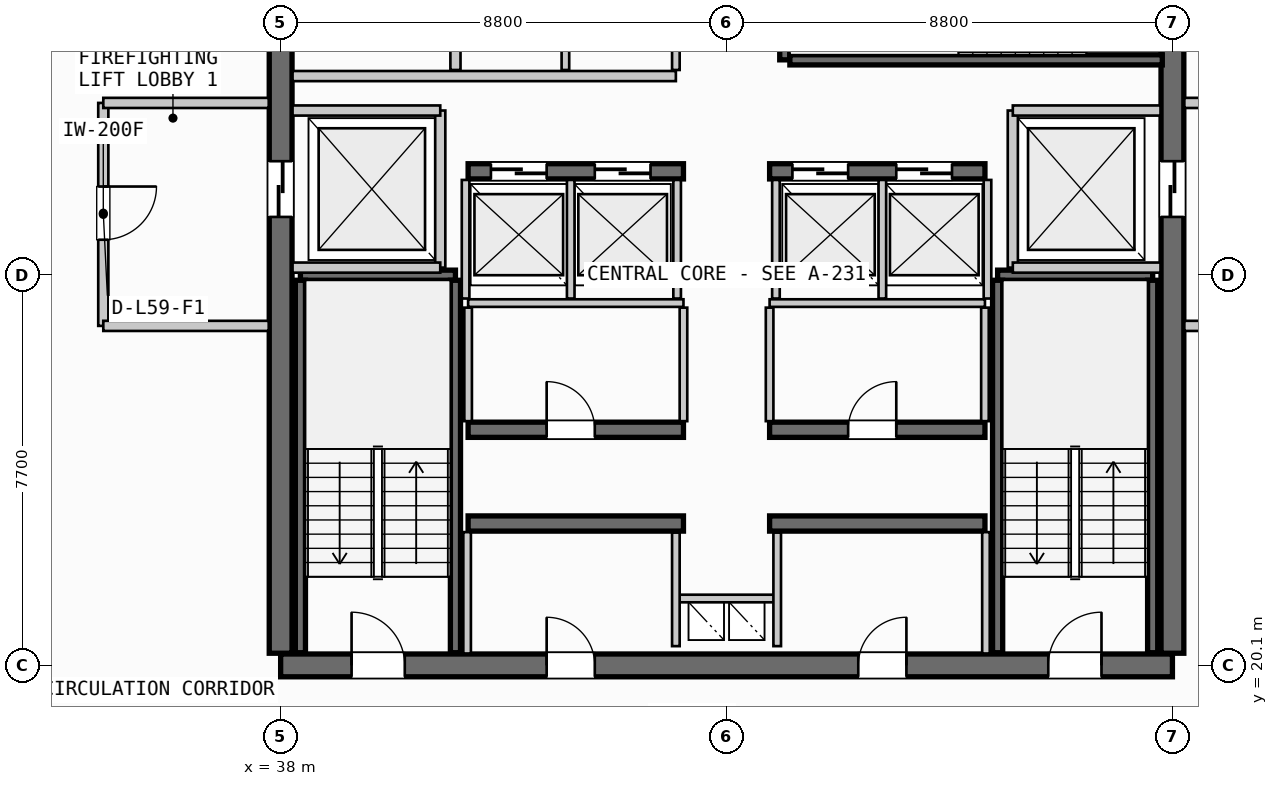
"""IFC4 building model, lengths in metres.
Left out: names, types, materials, properties, quantities, classifications, styles, units other than length and angle.
Written with IfcOpenShell. Run it as: python <this file> out.ifc"""

import sys

from ifc_helpers import new_model, si_unit, direction, frame, frame_2d, origin, place, context, subcontext, project, spatial, rectangle, extrude, source, transform, mapped, element, fill, save


model = new_model("IFC4")
c1 = context("Model", 3, precision=1e-05, world=origin(), true_north=direction((0.0, 1.0)))
c2 = subcontext(c1, "Body", "Model", "MODEL_VIEW")
j1 = project(units=[si_unit("LENGTHUNIT", "METRE"), si_unit("PLANEANGLEUNIT", "RADIAN")], contexts=[c1])
p1 = place(None, origin())
s1 = spatial("IfcSite", under=j1, at=p1, CompositionType="ELEMENT")
p2 = place(p1, origin())
s2 = spatial("IfcBuilding", under=s1, at=p2, CompositionType="ELEMENT")
p3 = place(p2, frame((0.0, 0.0, 228.4)))
s3 = spatial("IfcBuildingStorey", under=s2, at=p3, CompositionType="ELEMENT", Elevation=228.4)
p4 = place(p3, frame((38.0, 20.1, 0.0), z_axis=(0.0, 0.0, 1.0), x_axis=(1.0, 0.0, 0.0)))
e1 = element("IfcWall", 1, at=p4, inside=s3, PredefinedType="SHEAR", context=c2, shape_type="SweptSolid", body=[
    extrude(rectangle(XDim=17.6, YDim=0.45, at=frame_2d((8.8, 0.0))), origin(), (0.0, 0.0, 1.0), 3.21),
])
p5 = place(p4, frame((1.4, 0.0, 0.0)))
e2 = element("IfcOpeningElement", 2, at=p5, cuts=e1, PredefinedType="OPENING", context=c2, shape_type="SweptSolid", body=[
    extrude(rectangle(XDim=1.05, YDim=2.15, at=frame_2d((0.525, 1.075))), frame((0.0, 0.235, 0.0), z_axis=(0.0, -1.0, 0.0), x_axis=(1.0, 0.0, 0.0)), (0.0, 0.0, 1.0), 0.47),
])
p6 = place(p4, frame((15.15, 0.0, 0.0)))
e3 = element("IfcOpeningElement", 3, at=p6, cuts=e1, PredefinedType="OPENING", context=c2, shape_type="SweptSolid", body=[
    extrude(rectangle(XDim=1.05, YDim=2.15, at=frame_2d((0.525, 1.075))), frame((0.0, 0.235, 0.0), z_axis=(0.0, -1.0, 0.0), x_axis=(1.0, 0.0, 0.0)), (0.0, 0.0, 1.0), 0.47),
])
p7 = place(p4, frame((5.25, 0.0, 0.0)))
e4 = element("IfcOpeningElement", 4, at=p7, cuts=e1, PredefinedType="OPENING", context=c2, shape_type="SweptSolid", body=[
    extrude(rectangle(XDim=0.95, YDim=2.15, at=frame_2d((0.475, 1.075))), frame((0.0, 0.235, 0.0), z_axis=(0.0, -1.0, 0.0), x_axis=(1.0, 0.0, 0.0)), (0.0, 0.0, 1.0), 0.47),
])
p8 = place(p4, frame((11.4, 0.0, 0.0)))
e5 = element("IfcOpeningElement", 5, at=p8, cuts=e1, PredefinedType="OPENING", context=c2, shape_type="SweptSolid", body=[
    extrude(rectangle(XDim=0.95, YDim=2.15, at=frame_2d((0.475, 1.075))), frame((0.0, 0.235, 0.0), z_axis=(0.0, -1.0, 0.0), x_axis=(1.0, 0.0, 0.0)), (0.0, 0.0, 1.0), 0.47),
])
p9 = place(p3, frame((38.0, 35.26, 0.0), z_axis=(0.0, 0.0, 1.0), x_axis=(0.0, -1.0, 0.0)))
e6 = element("IfcWall", 6, at=p9, inside=s3, PredefinedType="SHEAR", context=c2, shape_type="SweptSolid", body=[
    extrude(rectangle(XDim=14.92, YDim=0.45, at=frame_2d((7.46, 0.0))), origin(), (0.0, 0.0, 1.0), 3.21),
])
p10 = place(p9, frame((5.21, 0.0, 0.0)))
e7 = element("IfcOpeningElement", 7, at=p10, cuts=e6, PredefinedType="OPENING", context=c2, shape_type="SweptSolid", body=[
    extrude(rectangle(XDim=1.1, YDim=2.2, at=frame_2d((0.55, 1.1))), frame((0.0, 0.235, 0.0), z_axis=(0.0, -1.0, 0.0), x_axis=(1.0, 0.0, 0.0)), (0.0, 0.0, 1.0), 0.47),
])
p11 = place(p3, frame((55.6, 20.34, 0.0), z_axis=(0.0, 0.0, 1.0), x_axis=(0.0, 1.0, 0.0)))
e8 = element("IfcWall", 8, at=p11, inside=s3, PredefinedType="SHEAR", context=c2, shape_type="SweptSolid", body=[
    extrude(rectangle(XDim=14.92, YDim=0.45, at=frame_2d((7.46, 0.0))), origin(), (0.0, 0.0, 1.0), 3.21),
])
p12 = place(p11, frame((12.71, 0.0, 0.0)))
e9 = element("IfcOpeningElement", 9, at=p12, cuts=e8, PredefinedType="OPENING", context=c2, shape_type="SweptSolid", body=[
    extrude(rectangle(XDim=1.05, YDim=2.15, at=frame_2d((0.525, 1.075))), frame((0.0, 0.235, 0.0), z_axis=(0.0, -1.0, 0.0), x_axis=(1.0, 0.0, 0.0)), (0.0, 0.0, 1.0), 0.47),
])
p13 = place(p11, frame((8.61, 0.0, 0.0)))
e10 = element("IfcOpeningElement", 10, at=p13, cuts=e8, PredefinedType="OPENING", context=c2, shape_type="SweptSolid", body=[
    extrude(rectangle(XDim=1.1, YDim=2.2, at=frame_2d((0.55, 1.1))), frame((0.0, 0.235, 0.0), z_axis=(0.0, -1.0, 0.0), x_axis=(1.0, 0.0, 0.0)), (0.0, 0.0, 1.0), 0.47),
])
for number, where, z_axis, x_axis in (
    (11, (41.7, 22.9, 0.0), (0.0, 0.0, 1.0), (1.0, 0.0, 0.0)),
    (12, (47.65, 22.9, 0.0), (0.0, 0.0, 1.0), (1.0, 0.0, 0.0)),
):
    element("IfcWall", number, at=place(p3, frame(where, z_axis=z_axis, x_axis=x_axis)), inside=s3, PredefinedType="SHEAR", context=c2, shape_type="SweptSolid", body=[
        extrude(rectangle(XDim=4.25, YDim=0.3, at=frame_2d((2.125, 0.0))), origin(), (0.0, 0.0, 1.0), 3.21),
    ])
p14 = place(p3, frame((41.7, 24.75, 0.0), z_axis=(0.0, 0.0, 1.0), x_axis=(1.0, 0.0, 0.0)))
e13 = element("IfcWall", 13, at=p14, inside=s3, PredefinedType="SHEAR", context=c2, shape_type="SweptSolid", body=[
    extrude(rectangle(XDim=4.25, YDim=0.3, at=frame_2d((2.125, 0.0))), origin(), (0.0, 0.0, 1.0), 3.21),
])
p15 = place(p14, frame((1.55, 0.0, 0.0)))
e14 = element("IfcOpeningElement", 14, at=p15, cuts=e13, PredefinedType="OPENING", context=c2, shape_type="SweptSolid", body=[
    extrude(rectangle(XDim=0.95, YDim=2.15, at=frame_2d((0.475, 1.075))), frame((0.0, 0.16, 0.0), z_axis=(0.0, -1.0, 0.0), x_axis=(1.0, 0.0, 0.0)), (0.0, 0.0, 1.0), 0.32),
])
p16 = place(p3, frame((47.65, 24.75, 0.0), z_axis=(0.0, 0.0, 1.0), x_axis=(1.0, 0.0, 0.0)))
e15 = element("IfcWall", 15, at=p16, inside=s3, PredefinedType="SHEAR", context=c2, shape_type="SweptSolid", body=[
    extrude(rectangle(XDim=4.25, YDim=0.3, at=frame_2d((2.125, 0.0))), origin(), (0.0, 0.0, 1.0), 3.21),
])
p17 = place(p16, frame((1.55, 0.0, 0.0)))
e16 = element("IfcOpeningElement", 16, at=p17, cuts=e15, PredefinedType="OPENING", context=c2, shape_type="SweptSolid", body=[
    extrude(rectangle(XDim=0.95, YDim=2.15, at=frame_2d((0.475, 1.075))), frame((0.0, 0.16, 0.0), z_axis=(0.0, -1.0, 0.0), x_axis=(1.0, 0.0, 0.0)), (0.0, 0.0, 1.0), 0.32),
])
p18 = place(p3, frame((41.7, 29.85, 0.0), z_axis=(0.0, 0.0, 1.0), x_axis=(1.0, 0.0, 0.0)))
e17 = element("IfcWall", 17, at=p18, inside=s3, PredefinedType="SHEAR", context=c2, shape_type="SweptSolid", body=[
    extrude(rectangle(XDim=4.25, YDim=0.3, at=frame_2d((2.125, 0.0))), origin(), (0.0, 0.0, 1.0), 3.21),
])
p19 = place(p18, frame((0.45, 0.0, 0.0)))
e18 = element("IfcOpeningElement", 18, at=p19, cuts=e17, PredefinedType="OPENING", context=c2, shape_type="SweptSolid", body=[
    extrude(rectangle(XDim=1.1, YDim=2.2, at=frame_2d((0.55, 1.1))), frame((0.0, 0.16, 0.0), z_axis=(0.0, -1.0, 0.0), x_axis=(1.0, 0.0, 0.0)), (0.0, 0.0, 1.0), 0.32),
])
p20 = place(p18, frame((2.5, 0.0, 0.0)))
e19 = element("IfcOpeningElement", 19, at=p20, cuts=e17, PredefinedType="OPENING", context=c2, shape_type="SweptSolid", body=[
    extrude(rectangle(XDim=1.1, YDim=2.2, at=frame_2d((0.55, 1.1))), frame((0.0, 0.16, 0.0), z_axis=(0.0, -1.0, 0.0), x_axis=(1.0, 0.0, 0.0)), (0.0, 0.0, 1.0), 0.32),
])
p21 = place(p3, frame((47.65, 29.85, 0.0), z_axis=(0.0, 0.0, 1.0), x_axis=(1.0, 0.0, 0.0)))
e20 = element("IfcWall", 20, at=p21, inside=s3, PredefinedType="SHEAR", context=c2, shape_type="SweptSolid", body=[
    extrude(rectangle(XDim=4.25, YDim=0.3, at=frame_2d((2.125, 0.0))), origin(), (0.0, 0.0, 1.0), 3.21),
])
p22 = place(p21, frame((0.45, 0.0, 0.0)))
e21 = element("IfcOpeningElement", 21, at=p22, cuts=e20, PredefinedType="OPENING", context=c2, shape_type="SweptSolid", body=[
    extrude(rectangle(XDim=1.1, YDim=2.2, at=frame_2d((0.55, 1.1))), frame((0.0, 0.16, 0.0), z_axis=(0.0, -1.0, 0.0), x_axis=(1.0, 0.0, 0.0)), (0.0, 0.0, 1.0), 0.32),
])
p23 = place(p21, frame((2.5, 0.0, 0.0)))
e22 = element("IfcOpeningElement", 22, at=p23, cuts=e20, PredefinedType="OPENING", context=c2, shape_type="SweptSolid", body=[
    extrude(rectangle(XDim=1.1, YDim=2.2, at=frame_2d((0.55, 1.1))), frame((0.0, 0.16, 0.0), z_axis=(0.0, -1.0, 0.0), x_axis=(1.0, 0.0, 0.0)), (0.0, 0.0, 1.0), 0.32),
])
p24 = place(p3, frame((38.39, 27.8, 0.0), z_axis=(0.0, 0.0, 1.0), x_axis=(1.0, 0.0, 0.0)))
e23 = element("IfcWall", 23, at=p24, inside=s3, PredefinedType="SHEAR", context=c2, shape_type="SweptSolid", body=[
    extrude(rectangle(XDim=3.06, YDim=0.2, at=frame_2d((1.53, 0.0))), origin(), (0.0, 0.0, 1.0), 3.21),
])
for number, where, z_axis, x_axis in (
    (24, (41.45, 27.7, 0.0), (0.0, 0.0, 1.0), (0.0, -1.0, 0.0)),
    (25, (38.39, 20.35, 0.0), (0.0, 0.0, 1.0), (0.0, 1.0, 0.0)),
):
    element("IfcWall", number, at=place(p3, frame(where, z_axis=z_axis, x_axis=x_axis)), inside=s3, PredefinedType="SHEAR", context=c2, shape_type="SweptSolid", body=[
        extrude(rectangle(XDim=7.35, YDim=0.2, at=frame_2d((3.675, 0.0))), origin(), (0.0, 0.0, 1.0), 3.21),
    ])
p25 = place(p3, frame((52.15, 27.8, 0.0), z_axis=(0.0, 0.0, 1.0), x_axis=(1.0, 0.0, 0.0)))
e26 = element("IfcWall", 26, at=p25, inside=s3, PredefinedType="SHEAR", context=c2, shape_type="SweptSolid", body=[
    extrude(rectangle(XDim=3.06, YDim=0.2, at=frame_2d((1.53, 0.0))), origin(), (0.0, 0.0, 1.0), 3.21),
])
for number, where, z_axis, x_axis in (
    (27, (55.21, 27.7, 0.0), (0.0, 0.0, 1.0), (0.0, -1.0, 0.0)),
    (28, (52.15, 20.35, 0.0), (0.0, 0.0, 1.0), (0.0, 1.0, 0.0)),
):
    element("IfcWall", number, at=place(p3, frame(where, z_axis=z_axis, x_axis=x_axis)), inside=s3, PredefinedType="SHEAR", context=c2, shape_type="SweptSolid", body=[
        extrude(rectangle(XDim=7.35, YDim=0.2, at=frame_2d((3.675, 0.0))), origin(), (0.0, 0.0, 1.0), 3.21),
    ])
p26 = place(p3, frame((47.95, 32.05, 0.0), z_axis=(0.0, 0.0, 1.0), x_axis=(0.0, 1.0, 0.0)))
e29 = element("IfcWall", 29, at=p26, inside=s3, PredefinedType="SHEAR", context=c2, shape_type="SweptSolid", body=[
    extrude(rectangle(XDim=3.06, YDim=0.2, at=frame_2d((1.53, 0.0))), origin(), (0.0, 0.0, 1.0), 3.21),
])
p27 = place(p3, frame((55.4, 32.05, 0.0), z_axis=(0.0, 0.0, 1.0), x_axis=(-1.0, 0.0, 0.0)))
e30 = element("IfcWall", 30, at=p27, inside=s3, PredefinedType="SHEAR", context=c2, shape_type="SweptSolid", body=[
    extrude(rectangle(XDim=7.35, YDim=0.2, at=frame_2d((3.675, 0.0))), origin(), (0.0, 0.0, 1.0), 3.21),
])
p28 = place(p3, frame((45.8, 21.42, 0.0), z_axis=(0.0, 0.0, 1.0), x_axis=(1.0, 0.0, 0.0)))
e31 = element("IfcWall", 31, at=p28, inside=s3, PredefinedType="PARTITIONING", context=c2, shape_type="SweptSolid", body=[
    extrude(rectangle(XDim=2.0, YDim=0.15, at=frame_2d((1.0, 0.0))), origin(), (0.0, 0.0, 1.0), 2.28),
])
for number, where, z_axis, x_axis in (
    (32, (45.8, 20.48, 0.0), (0.0, 0.0, 1.0), (0.0, 1.0, 0.0)),
    (33, (47.8, 20.48, 0.0), (0.0, 0.0, 1.0), (0.0, 1.0, 0.0)),
):
    element("IfcWall", number, at=place(p3, frame(where, z_axis=z_axis, x_axis=x_axis)), inside=s3, PredefinedType="PARTITIONING", context=c2, shape_type="SweptSolid", body=[
        extrude(rectangle(XDim=2.24, YDim=0.15, at=frame_2d((1.12, 0.0))), origin(), (0.0, 0.0, 1.0), 2.28),
    ])
p29 = place(p3, frame((41.15, 27.95, 0.0), z_axis=(0.0, 0.0, 1.0), x_axis=(0.0, 1.0, 0.0)))
e34 = element("IfcWall", 34, at=p29, inside=s3, PredefinedType="PARTITIONING", context=c2, shape_type="SweptSolid", body=[
    extrude(rectangle(XDim=3.1, YDim=0.2, at=frame_2d((1.55, 0.0))), origin(), (0.0, 0.0, 1.0), 2.28),
])
for number, where, z_axis, x_axis in (
    (35, (38.235, 27.95, 0.0), (0.0, 0.0, 1.0), (1.0, 0.0, 0.0)),
    (36, (38.235, 31.05, 0.0), (0.0, 0.0, 1.0), (1.0, 0.0, 0.0)),
):
    element("IfcWall", number, at=place(p3, frame(where, z_axis=z_axis, x_axis=x_axis)), inside=s3, PredefinedType="PARTITIONING", context=c2, shape_type="SweptSolid", body=[
        extrude(rectangle(XDim=2.915, YDim=0.2, at=frame_2d((1.458, 0.0))), origin(), (0.0, 0.0, 1.0), 2.28),
    ])
p30 = place(p3, frame((34.5, 31.2, 0.0), z_axis=(0.0, 0.0, 1.0), x_axis=(0.0, -1.0, 0.0)))
e37 = element("IfcWall", 37, at=p30, inside=s3, PredefinedType="PARTITIONING", context=c2, shape_type="SweptSolid", body=[
    extrude(rectangle(XDim=4.4, YDim=0.2, at=frame_2d((2.2, 0.0))), origin(), (0.0, 0.0, 1.0), 2.28),
])
p31 = place(p30, frame((1.65, 0.0, 0.0)))
e38 = element("IfcOpeningElement", 38, at=p31, cuts=e37, PredefinedType="OPENING", context=c2, shape_type="SweptSolid", body=[
    extrude(rectangle(XDim=1.05, YDim=2.15, at=frame_2d((0.525, 1.075))), frame((0.0, 0.11, 0.0), z_axis=(0.0, -1.0, 0.0), x_axis=(1.0, 0.0, 0.0)), (0.0, 0.0, 1.0), 0.22),
])
for number, where, z_axis, x_axis in (
    (39, (34.5, 26.8, 0.0), (0.0, 0.0, 1.0), (1.0, 0.0, 0.0)),
    (40, (34.5, 31.2, 0.0), (0.0, 0.0, 1.0), (1.0, 0.0, 0.0)),
):
    element("IfcWall", number, at=place(p3, frame(where, z_axis=z_axis, x_axis=x_axis)), inside=s3, PredefinedType="PARTITIONING", context=c2, shape_type="SweptSolid", body=[
        extrude(rectangle(XDim=3.265, YDim=0.2, at=frame_2d((1.632, 0.0))), origin(), (0.0, 0.0, 1.0), 2.28),
    ])
p32 = place(p3, frame((52.45, 27.95, 0.0), z_axis=(0.0, 0.0, 1.0), x_axis=(0.0, 1.0, 0.0)))
e41 = element("IfcWall", 41, at=p32, inside=s3, PredefinedType="PARTITIONING", context=c2, shape_type="SweptSolid", body=[
    extrude(rectangle(XDim=3.1, YDim=0.2, at=frame_2d((1.55, 0.0))), origin(), (0.0, 0.0, 1.0), 2.28),
])
for number, where, z_axis, x_axis in (
    (42, (52.45, 27.95, 0.0), (0.0, 0.0, 1.0), (1.0, 0.0, 0.0)),
    (43, (52.45, 31.05, 0.0), (0.0, 0.0, 1.0), (1.0, 0.0, 0.0)),
):
    element("IfcWall", number, at=place(p3, frame(where, z_axis=z_axis, x_axis=x_axis)), inside=s3, PredefinedType="PARTITIONING", context=c2, shape_type="SweptSolid", body=[
        extrude(rectangle(XDim=2.915, YDim=0.2, at=frame_2d((1.458, 0.0))), origin(), (0.0, 0.0, 1.0), 2.28),
    ])
for number, where, z_axis, x_axis in (
    (44, (55.835, 26.8, 0.0), (0.0, 0.0, 1.0), (1.0, 0.0, 0.0)),
    (45, (55.835, 31.2, 0.0), (0.0, 0.0, 1.0), (1.0, 0.0, 0.0)),
):
    element("IfcWall", number, at=place(p3, frame(where, z_axis=z_axis, x_axis=x_axis)), inside=s3, PredefinedType="PARTITIONING", context=c2, shape_type="SweptSolid", body=[
        extrude(rectangle(XDim=3.265, YDim=0.2, at=frame_2d((1.633, 0.0))), origin(), (0.0, 0.0, 1.0), 2.28),
    ])
for number, where, z_axis, x_axis in (
    (46, (41.68, 20.335, 0.0), (0.0, 0.0, 1.0), (0.0, 1.0, 0.0)),
    (47, (51.92, 20.335, 0.0), (0.0, 0.0, 1.0), (0.0, 1.0, 0.0)),
):
    element("IfcWall", number, at=place(p3, frame(where, z_axis=z_axis, x_axis=x_axis)), inside=s3, PredefinedType="PARTITIONING", context=c2, shape_type="SweptSolid", body=[
        extrude(rectangle(XDim=2.395, YDim=0.15, at=frame_2d((1.198, 0.0))), origin(), (0.0, 0.0, 1.0), 2.28),
    ])
for number, where, z_axis, x_axis in (
    (48, (41.7, 27.25, 0.0), (0.0, 0.0, 1.0), (1.0, 0.0, 0.0)),
    (49, (47.65, 27.25, 0.0), (0.0, 0.0, 1.0), (1.0, 0.0, 0.0)),
):
    element("IfcWall", number, at=place(p3, frame(where, z_axis=z_axis, x_axis=x_axis)), inside=s3, PredefinedType="PARTITIONING", context=c2, shape_type="SweptSolid", body=[
        extrude(rectangle(XDim=4.25, YDim=0.15, at=frame_2d((2.125, 0.0))), origin(), (0.0, 0.0, 1.0), 2.28),
    ])
for number, where, z_axis, x_axis in (
    (50, (41.7, 24.92, 0.0), (0.0, 0.0, 1.0), (0.0, 1.0, 0.0)),
    (51, (45.95, 24.92, 0.0), (0.0, 0.0, 1.0), (0.0, 1.0, 0.0)),
    (52, (47.65, 24.92, 0.0), (0.0, 0.0, 1.0), (0.0, 1.0, 0.0)),
    (53, (51.9, 24.92, 0.0), (0.0, 0.0, 1.0), (0.0, 1.0, 0.0)),
):
    element("IfcWall", number, at=place(p3, frame(where, z_axis=z_axis, x_axis=x_axis)), inside=s3, PredefinedType="PARTITIONING", context=c2, shape_type="SweptSolid", body=[
        extrude(rectangle(XDim=2.24, YDim=0.15, at=frame_2d((1.12, 0.0))), origin(), (0.0, 0.0, 1.0), 2.28),
    ])
for number, where, z_axis, x_axis in (
    (54, (41.65, 27.34, 0.0), (0.0, 0.0, 1.0), (0.0, 1.0, 0.0)),
    (55, (43.725, 27.34, 0.0), (0.0, 0.0, 1.0), (0.0, 1.0, 0.0)),
    (56, (45.825, 27.34, 0.0), (0.0, 0.0, 1.0), (0.0, 1.0, 0.0)),
    (57, (47.775, 27.34, 0.0), (0.0, 0.0, 1.0), (0.0, 1.0, 0.0)),
    (58, (49.875, 27.34, 0.0), (0.0, 0.0, 1.0), (0.0, 1.0, 0.0)),
    (59, (51.95, 27.34, 0.0), (0.0, 0.0, 1.0), (0.0, 1.0, 0.0)),
):
    element("IfcWall", number, at=place(p3, frame(where, z_axis=z_axis, x_axis=x_axis)), inside=s3, PredefinedType="PARTITIONING", context=c2, shape_type="SweptSolid", body=[
        extrude(rectangle(XDim=2.34, YDim=0.15, at=frame_2d((1.17, 0.0))), origin(), (0.0, 0.0, 1.0), 2.28),
    ])
p33 = place(p3, frame((41.45, 31.85, 0.0), z_axis=(0.0, 0.0, 1.0), x_axis=(0.0, 1.0, 0.0)))
e60 = element("IfcWall", 60, at=p33, inside=s3, PredefinedType="PARTITIONING", context=c2, shape_type="SweptSolid", body=[
    extrude(rectangle(XDim=3.415, YDim=0.2, at=frame_2d((1.708, 0.0))), origin(), (0.0, 0.0, 1.0), 2.28),
])
p34 = place(p3, frame((38.235, 31.73, 0.0), z_axis=(0.0, 0.0, 1.0), x_axis=(1.0, 0.0, 0.0)))
e61 = element("IfcWall", 61, at=p34, inside=s3, PredefinedType="PARTITIONING", context=c2, shape_type="SweptSolid", body=[
    extrude(rectangle(XDim=7.565, YDim=0.2, at=frame_2d((3.782, 0.0))), origin(), (0.0, 0.0, 1.0), 2.28),
])
p35 = place(p3, frame((45.8, 31.85, 0.0), z_axis=(0.0, 0.0, 1.0), x_axis=(0.0, 1.0, 0.0)))
e62 = element("IfcWall", 62, at=p35, inside=s3, PredefinedType="PARTITIONING", context=c2, shape_type="SweptSolid", body=[
    extrude(rectangle(XDim=3.415, YDim=0.15, at=frame_2d((1.708, 0.0))), origin(), (0.0, 0.0, 1.0), 2.28),
])
p36 = place(p3, frame((43.62, 31.85, 0.0), z_axis=(0.0, 0.0, 1.0), x_axis=(0.0, 1.0, 0.0)))
e63 = element("IfcWall", 63, at=p36, inside=s3, PredefinedType="PLUMBINGWALL", context=c2, shape_type="SweptSolid", body=[
    extrude(rectangle(XDim=3.415, YDim=0.15, at=frame_2d((1.708, 0.0))), origin(), (0.0, 0.0, 1.0), 2.28),
])
m1 = source(origin(), c2, "Body", "SweptSolid", [
    extrude(rectangle(XDim=1.05, YDim=2.15, at=frame_2d((0.525, 1.075))), frame((0.0, 0.025, 0.0), z_axis=(0.0, -1.0, 0.0), x_axis=(1.0, 0.0, 0.0)), (0.0, 0.0, 1.0), 0.05),
])
p37 = place(p5, origin())
e64 = element("IfcDoor", 64, at=p37, inside=s3, OperationType="SINGLE_SWING_LEFT", PredefinedType="DOOR", context=c2, shape_type="MappedRepresentation", body=[
    mapped(m1, transform((0.0, 0.0, 0.0), scale=1.0)),
])
fill(e2, e64)
p38 = place(p6, origin())
e65 = element("IfcDoor", 65, at=p38, inside=s3, OperationType="SINGLE_SWING_RIGHT", PredefinedType="DOOR", context=c2, shape_type="MappedRepresentation", body=[
    mapped(m1, transform((0.0, 0.0, 0.0), scale=1.0)),
])
fill(e3, e65)
m2 = source(origin(), c2, "Body", "SweptSolid", [
    extrude(rectangle(XDim=1.1, YDim=2.2, at=frame_2d((0.55, 1.1))), frame((0.0, 0.025, 0.0), z_axis=(0.0, -1.0, 0.0), x_axis=(1.0, 0.0, 0.0)), (0.0, 0.0, 1.0), 0.05),
])
p39 = place(p10, origin())
e66 = element("IfcDoor", 66, at=p39, inside=s3, OperationType="SLIDING_TO_LEFT", PredefinedType="DOOR", context=c2, shape_type="MappedRepresentation", body=[
    mapped(m2, transform((0.0, 0.0, 0.0), scale=1.0)),
])
fill(e7, e66)
p40 = place(p13, origin())
e67 = element("IfcDoor", 67, at=p40, inside=s3, OperationType="SLIDING_TO_RIGHT", PredefinedType="DOOR", context=c2, shape_type="MappedRepresentation", body=[
    mapped(m2, transform((0.0, 0.0, 0.0), scale=1.0)),
])
fill(e10, e67)
m3 = source(origin(), c2, "Body", "SweptSolid", [
    extrude(rectangle(XDim=0.95, YDim=2.15, at=frame_2d((0.475, 1.075))), frame((0.0, 0.025, 0.0), z_axis=(0.0, -1.0, 0.0), x_axis=(1.0, 0.0, 0.0)), (0.0, 0.0, 1.0), 0.05),
])
p41 = place(p7, origin())
e68 = element("IfcDoor", 68, at=p41, inside=s3, OperationType="SINGLE_SWING_LEFT", PredefinedType="DOOR", context=c2, shape_type="MappedRepresentation", body=[
    mapped(m3, transform((0.0, 0.0, 0.0), scale=1.0)),
])
fill(e4, e68)
p42 = place(p8, origin())
e69 = element("IfcDoor", 69, at=p42, inside=s3, OperationType="SINGLE_SWING_RIGHT", PredefinedType="DOOR", context=c2, shape_type="MappedRepresentation", body=[
    mapped(m3, transform((0.0, 0.0, 0.0), scale=1.0)),
])
fill(e5, e69)
p43 = place(p15, origin())
e70 = element("IfcDoor", 70, at=p43, inside=s3, OperationType="SINGLE_SWING_LEFT", PredefinedType="DOOR", context=c2, shape_type="MappedRepresentation", body=[
    mapped(m3, transform((0.0, 0.0, 0.0), scale=1.0)),
])
fill(e14, e70)
p44 = place(p17, origin())
e71 = element("IfcDoor", 71, at=p44, inside=s3, OperationType="SINGLE_SWING_RIGHT", PredefinedType="DOOR", context=c2, shape_type="MappedRepresentation", body=[
    mapped(m3, transform((0.0, 0.0, 0.0), scale=1.0)),
])
fill(e16, e71)
p45 = place(p19, origin())
e72 = element("IfcDoor", 72, at=p45, inside=s3, OperationType="SLIDING_TO_LEFT", PredefinedType="DOOR", context=c2, shape_type="MappedRepresentation", body=[
    mapped(m2, transform((0.0, 0.0, 0.0), scale=1.0)),
])
fill(e18, e72)
p46 = place(p20, origin())
e73 = element("IfcDoor", 73, at=p46, inside=s3, OperationType="SLIDING_TO_LEFT", PredefinedType="DOOR", context=c2, shape_type="MappedRepresentation", body=[
    mapped(m2, transform((0.0, 0.0, 0.0), scale=1.0)),
])
fill(e19, e73)
p47 = place(p22, origin())
e74 = element("IfcDoor", 74, at=p47, inside=s3, OperationType="SLIDING_TO_LEFT", PredefinedType="DOOR", context=c2, shape_type="MappedRepresentation", body=[
    mapped(m2, transform((0.0, 0.0, 0.0), scale=1.0)),
])
fill(e21, e74)
p48 = place(p23, origin())
e75 = element("IfcDoor", 75, at=p48, inside=s3, OperationType="SLIDING_TO_LEFT", PredefinedType="DOOR", context=c2, shape_type="MappedRepresentation", body=[
    mapped(m2, transform((0.0, 0.0, 0.0), scale=1.0)),
])
fill(e22, e75)
p49 = place(p31, origin())
e76 = element("IfcDoor", 76, at=p49, inside=s3, OperationType="SINGLE_SWING_LEFT", PredefinedType="DOOR", context=c2, shape_type="MappedRepresentation", body=[
    mapped(m1, transform((0.0, 0.0, 0.0), scale=1.0)),
])
fill(e38, e76)
save(model, sys.argv[1])
